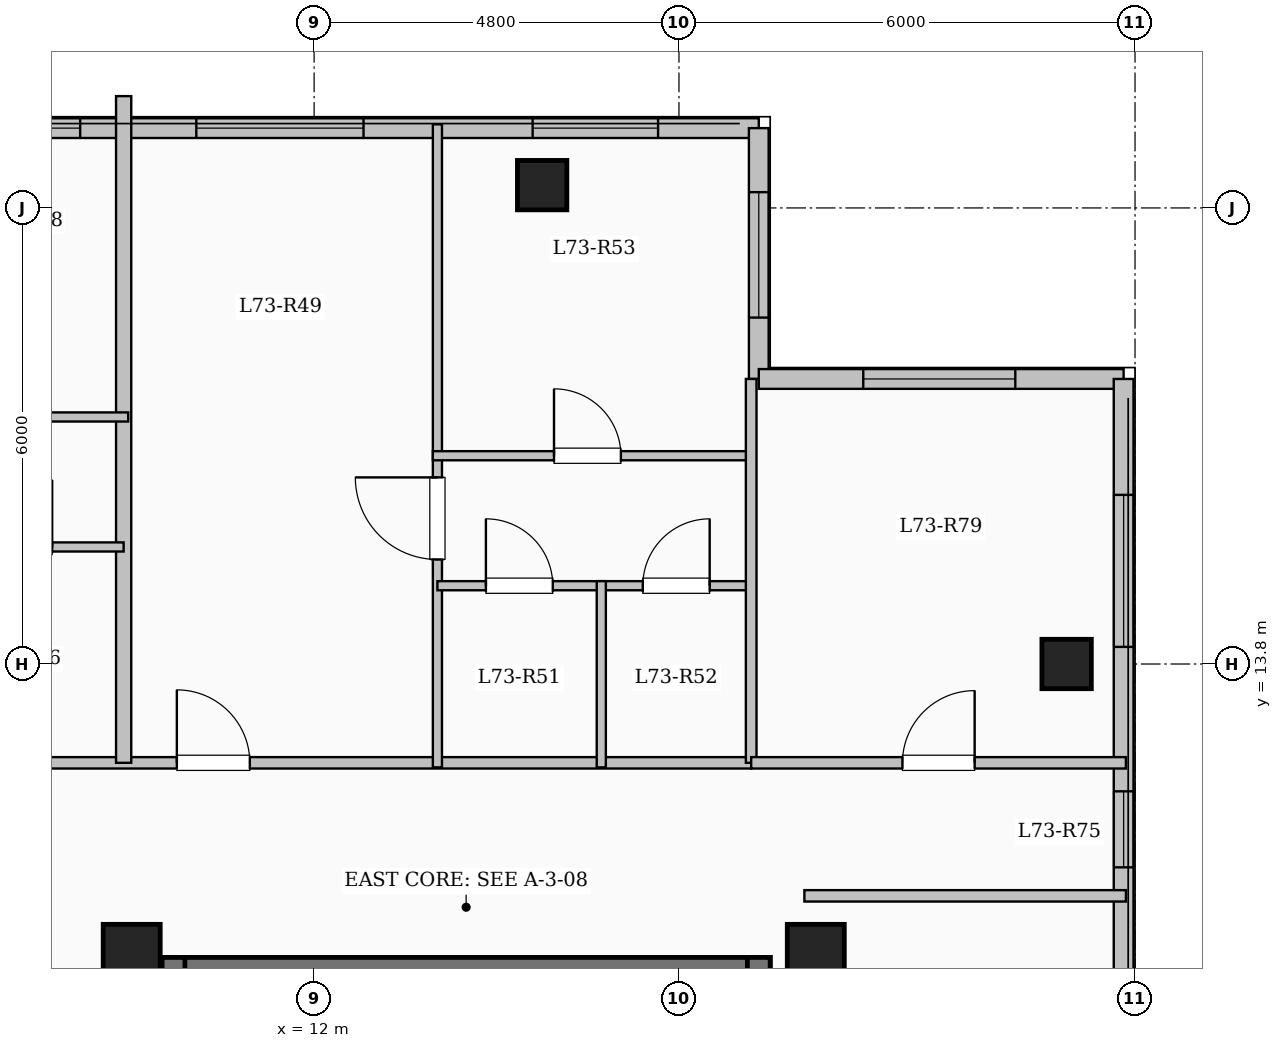
"""IFC4 building model, lengths in metres.
Left out: names, types, materials, properties, quantities, classifications, styles, units other than length and angle.
Written with IfcOpenShell. Run it as: python <this file> out.ifc"""

import sys

from ifc_helpers import new_model, si_unit, direction, frame, frame_2d, origin, origin_2d, place, context, subcontext, project, spatial, rectangle, extrude, element, fill, save


model = new_model("IFC4")
c1 = context("Model", 3, precision=1e-05, world=origin(), true_north=direction((0.0, 1.0)))
c2 = subcontext(c1, "Body", "Model", "MODEL_VIEW")
j1 = project(units=[si_unit("LENGTHUNIT", "METRE"), si_unit("PLANEANGLEUNIT", "RADIAN")], contexts=[c1])
p1 = place(None, origin())
s1 = spatial("IfcSite", under=j1, at=p1, CompositionType="ELEMENT")
p2 = place(p1, origin())
s2 = spatial("IfcBuilding", under=s1, at=p2, CompositionType="ELEMENT")
p3 = place(p2, frame((0.0, 0.0, 268.3)))
s3 = spatial("IfcBuildingStorey", under=s2, at=p3, CompositionType="ELEMENT", Elevation=268.3)
for number, where, z_axis, x_axis in (
    (1, (9.6, 10.0, 0.0), (0.0, 0.0, 1.0), (1.0, 0.0, 0.0)),
    (2, (18.6, 10.0, 0.0), (0.0, 0.0, 1.0), (1.0, 0.0, 0.0)),
):
    element("IfcColumn", number, at=place(p3, frame(where, z_axis=z_axis, x_axis=x_axis)), inside=s3, PredefinedType="COLUMN", context=c2, shape_type="SweptSolid", body=[
        extrude(rectangle(XDim=0.75, YDim=0.75, at=origin_2d()), origin(), (0.0, 0.0, 1.0), 3.35),
    ])
for number, where, z_axis, x_axis in (
    (3, (15.0, 20.1, 0.0), (0.0, 0.0, 1.0), (1.0, 0.0, 0.0)),
    (4, (21.9, 13.8, 0.0), (0.0, 0.0, 1.0), (1.0, 0.0, 0.0)),
):
    element("IfcColumn", number, at=place(p3, frame(where, z_axis=z_axis, x_axis=x_axis)), inside=s3, PredefinedType="COLUMN", context=c2, shape_type="SweptSolid", body=[
        extrude(rectangle(XDim=0.65, YDim=0.65, at=origin_2d()), origin(), (0.0, 0.0, 1.0), 3.35),
    ])
p4 = place(p3, frame((7.35, 20.85, 0.0), z_axis=(0.0, 0.0, 1.0), x_axis=(1.0, 0.0, 0.0)))
e5 = element("IfcWall", 5, at=p4, inside=s3, PredefinedType="SOLIDWALL", context=c2, shape_type="SweptSolid", body=[
    extrude(rectangle(XDim=10.5, YDim=0.26, at=frame_2d((5.25, 0.0))), origin(), (0.0, 0.0, 1.0), 3.05),
])
p5 = place(p4, frame((0.372, 0.0, 0.95)))
e6 = element("IfcOpeningElement", 6, at=p5, cuts=e5, PredefinedType="OPENING", context=c2, shape_type="SweptSolid", body=[
    extrude(rectangle(XDim=1.2, YDim=1.5, at=frame_2d((0.6, 0.75))), frame((0.0, 0.14, 0.0), z_axis=(0.0, -1.0, 0.0), x_axis=(1.0, 0.0, 0.0)), (0.0, 0.0, 1.0), 0.28),
])
p6 = place(p4, frame((3.1, 0.0, 0.9)))
e7 = element("IfcOpeningElement", 7, at=p6, cuts=e5, PredefinedType="OPENING", context=c2, shape_type="SweptSolid", body=[
    extrude(rectangle(XDim=2.2, YDim=1.75, at=frame_2d((1.1, 0.875))), frame((0.0, 0.14, 0.0), z_axis=(0.0, -1.0, 0.0), x_axis=(1.0, 0.0, 0.0)), (0.0, 0.0, 1.0), 0.28),
])
p7 = place(p4, frame((7.525, 0.0, 0.9)))
e8 = element("IfcOpeningElement", 8, at=p7, cuts=e5, PredefinedType="OPENING", context=c2, shape_type="SweptSolid", body=[
    extrude(rectangle(XDim=1.65, YDim=1.6, at=frame_2d((0.825, 0.8))), frame((0.0, 0.14, 0.0), z_axis=(0.0, -1.0, 0.0), x_axis=(1.0, 0.0, 0.0)), (0.0, 0.0, 1.0), 0.28),
])
p8 = place(p3, frame((17.85, 20.85, 0.0), z_axis=(0.0, 0.0, 1.0), x_axis=(0.0, -1.0, 0.0)))
e9 = element("IfcWall", 9, at=p8, inside=s3, PredefinedType="SOLIDWALL", context=c2, shape_type="SweptSolid", body=[
    extrude(rectangle(XDim=3.3, YDim=0.26, at=frame_2d((1.65, 0.0))), origin(), (0.0, 0.0, 1.0), 3.05),
])
p9 = place(p8, frame((0.843, 0.0, 0.9)))
e10 = element("IfcOpeningElement", 10, at=p9, cuts=e9, PredefinedType="OPENING", context=c2, shape_type="SweptSolid", body=[
    extrude(rectangle(XDim=1.65, YDim=1.6, at=frame_2d((0.825, 0.8))), frame((0.0, 0.14, 0.0), z_axis=(0.0, -1.0, 0.0), x_axis=(1.0, 0.0, 0.0)), (0.0, 0.0, 1.0), 0.28),
])
p10 = place(p3, frame((17.85, 17.55, 0.0), z_axis=(0.0, 0.0, 1.0), x_axis=(1.0, 0.0, 0.0)))
e11 = element("IfcWall", 11, at=p10, inside=s3, PredefinedType="SOLIDWALL", context=c2, shape_type="SweptSolid", body=[
    extrude(rectangle(XDim=4.8, YDim=0.26, at=frame_2d((2.4, 0.0))), origin(), (0.0, 0.0, 1.0), 3.05),
])
p11 = place(p10, frame((1.375, 0.0, 0.9)))
e12 = element("IfcOpeningElement", 12, at=p11, cuts=e11, PredefinedType="OPENING", context=c2, shape_type="SweptSolid", body=[
    extrude(rectangle(XDim=2.0, YDim=1.7, at=frame_2d((1.0, 0.85))), frame((0.0, 0.14, 0.0), z_axis=(0.0, -1.0, 0.0), x_axis=(1.0, 0.0, 0.0)), (0.0, 0.0, 1.0), 0.28),
])
p12 = place(p3, frame((22.65, 17.55, 0.0), z_axis=(0.0, 0.0, 1.0), x_axis=(0.0, -1.0, 0.0)))
e13 = element("IfcWall", 13, at=p12, inside=s3, PredefinedType="SOLIDWALL", context=c2, shape_type="SweptSolid", body=[
    extrude(rectangle(XDim=35.1, YDim=0.26, at=frame_2d((17.55, 0.0))), origin(), (0.0, 0.0, 1.0), 3.05),
])
p13 = place(p12, frame((1.525, 0.0, 0.9)))
e14 = element("IfcOpeningElement", 14, at=p13, cuts=e13, PredefinedType="OPENING", context=c2, shape_type="SweptSolid", body=[
    extrude(rectangle(XDim=2.0, YDim=1.7, at=frame_2d((1.0, 0.85))), frame((0.0, 0.14, 0.0), z_axis=(0.0, -1.0, 0.0), x_axis=(1.0, 0.0, 0.0)), (0.0, 0.0, 1.0), 0.28),
])
p14 = place(p12, frame((5.425, 0.0, 0.95)))
e15 = element("IfcOpeningElement", 15, at=p14, cuts=e13, PredefinedType="OPENING", context=c2, shape_type="SweptSolid", body=[
    extrude(rectangle(XDim=1.0, YDim=1.5, at=frame_2d((0.5, 0.75))), frame((0.0, 0.14, 0.0), z_axis=(0.0, -1.0, 0.0), x_axis=(1.0, 0.0, 0.0)), (0.0, 0.0, 1.0), 0.28),
])
p15 = place(p12, frame((8.675, 0.0, 0.9)))
e16 = element("IfcOpeningElement", 16, at=p15, cuts=e13, PredefinedType="OPENING", context=c2, shape_type="SweptSolid", body=[
    extrude(rectangle(XDim=2.0, YDim=1.7, at=frame_2d((1.0, 0.85))), frame((0.0, 0.14, 0.0), z_axis=(0.0, -1.0, 0.0), x_axis=(1.0, 0.0, 0.0)), (0.0, 0.0, 1.0), 0.28),
])
p16 = place(p12, frame((13.5, 0.0, 0.9)))
e17 = element("IfcOpeningElement", 17, at=p16, cuts=e13, PredefinedType="OPENING", context=c2, shape_type="SweptSolid", body=[
    extrude(rectangle(XDim=1.65, YDim=1.6, at=frame_2d((0.825, 0.8))), frame((0.0, 0.14, 0.0), z_axis=(0.0, -1.0, 0.0), x_axis=(1.0, 0.0, 0.0)), (0.0, 0.0, 1.0), 0.28),
])
p17 = place(p12, frame((19.35, 0.0, 0.9)))
e18 = element("IfcOpeningElement", 18, at=p17, cuts=e13, PredefinedType="OPENING", context=c2, shape_type="SweptSolid", body=[
    extrude(rectangle(XDim=2.2, YDim=1.75, at=frame_2d((1.1, 0.875))), frame((0.0, 0.14, 0.0), z_axis=(0.0, -1.0, 0.0), x_axis=(1.0, 0.0, 0.0)), (0.0, 0.0, 1.0), 0.28),
])
p18 = place(p12, frame((25.275, 0.0, 0.95)))
e19 = element("IfcOpeningElement", 19, at=p18, cuts=e13, PredefinedType="OPENING", context=c2, shape_type="SweptSolid", body=[
    extrude(rectangle(XDim=1.2, YDim=1.5, at=frame_2d((0.6, 0.75))), frame((0.0, 0.14, 0.0), z_axis=(0.0, -1.0, 0.0), x_axis=(1.0, 0.0, 0.0)), (0.0, 0.0, 1.0), 0.28),
])
p19 = place(p12, frame((29.925, 0.0, 0.9)))
e20 = element("IfcOpeningElement", 20, at=p19, cuts=e13, PredefinedType="OPENING", context=c2, shape_type="SweptSolid", body=[
    extrude(rectangle(XDim=2.2, YDim=1.75, at=frame_2d((1.1, 0.875))), frame((0.0, 0.14, 0.0), z_axis=(0.0, -1.0, 0.0), x_axis=(1.0, 0.0, 0.0)), (0.0, 0.0, 1.0), 0.28),
])
p20 = place(p3, frame((10.0, 9.79, 0.0), z_axis=(0.0, 0.0, 1.0), x_axis=(1.0, 0.0, 0.0)))
e21 = element("IfcWall", 21, at=p20, inside=s3, PredefinedType="SHEAR", context=c2, shape_type="SweptSolid", body=[
    extrude(rectangle(XDim=8.0, YDim=0.3, at=frame_2d((4.0, 0.0))), origin(), (0.0, 0.0, 1.0), 3.35),
])
for number, where, z_axis, x_axis in (
    (22, (10.15, 6.35, 0.0), (0.0, 0.0, 1.0), (0.0, 1.0, 0.0)),
    (23, (17.85, 6.35, 0.0), (0.0, 0.0, 1.0), (0.0, 1.0, 0.0)),
):
    element("IfcWall", number, at=place(p3, frame(where, z_axis=z_axis, x_axis=x_axis)), inside=s3, PredefinedType="SHEAR", context=c2, shape_type="SweptSolid", body=[
        extrude(rectangle(XDim=3.59, YDim=0.3, at=frame_2d((1.795, 0.0))), origin(), (0.0, 0.0, 1.0), 3.35),
    ])
p21 = place(p3, frame((3.85, 12.5, 0.0), z_axis=(0.0, 0.0, 1.0), x_axis=(1.0, 0.0, 0.0)))
e24 = element("IfcWall", 24, at=p21, inside=s3, PredefinedType="PARTITIONING", context=c2, shape_type="SweptSolid", body=[
    extrude(rectangle(XDim=13.9, YDim=0.15, at=frame_2d((6.95, 0.0))), origin(), (0.0, 0.0, 1.0), 3.05),
])
p22 = place(p21, frame((0.7, 0.0, 0.0)))
e25 = element("IfcOpeningElement", 25, at=p22, cuts=e24, PredefinedType="OPENING", context=c2, shape_type="SweptSolid", body=[
    extrude(rectangle(XDim=0.96, YDim=2.15, at=frame_2d((0.48, 1.075))), frame((0.0, 0.085, 0.0), z_axis=(0.0, -1.0, 0.0), x_axis=(1.0, 0.0, 0.0)), (0.0, 0.0, 1.0), 0.17),
])
p23 = place(p21, frame((6.344, 0.0, 0.0)))
e26 = element("IfcOpeningElement", 26, at=p23, cuts=e24, PredefinedType="OPENING", context=c2, shape_type="SweptSolid", body=[
    extrude(rectangle(XDim=0.96, YDim=2.15, at=frame_2d((0.48, 1.075))), frame((0.0, 0.085, 0.0), z_axis=(0.0, -1.0, 0.0), x_axis=(1.0, 0.0, 0.0)), (0.0, 0.0, 1.0), 0.17),
])
p24 = place(p3, frame((9.494, 12.5, 0.0), z_axis=(0.0, 0.0, 1.0), x_axis=(0.0, 1.0, 0.0)))
e27 = element("IfcWall", 27, at=p24, inside=s3, PredefinedType="SOLIDWALL", context=c2, shape_type="SweptSolid", body=[
    extrude(rectangle(XDim=8.771, YDim=0.2, at=frame_2d((4.385, 0.0))), origin(), (0.0, 0.0, 1.0), 3.05),
])
p25 = place(p3, frame((6.734, 15.34, 0.0), z_axis=(0.0, 0.0, 1.0), x_axis=(1.0, 0.0, 0.0)))
e28 = element("IfcWall", 28, at=p25, inside=s3, PredefinedType="PARTITIONING", context=c2, shape_type="SweptSolid", body=[
    extrude(rectangle(XDim=2.76, YDim=0.12, at=frame_2d((1.38, 0.0))), origin(), (0.0, 0.0, 1.0), 2.735),
])
p26 = place(p25, frame((0.94, 0.0, 0.0)))
e29 = element("IfcOpeningElement", 29, at=p26, cuts=e28, PredefinedType="OPENING", context=c2, shape_type="SweptSolid", body=[
    extrude(rectangle(XDim=0.88, YDim=2.1, at=frame_2d((0.44, 1.05))), frame((0.0, 0.07, 0.0), z_axis=(0.0, -1.0, 0.0), x_axis=(1.0, 0.0, 0.0)), (0.0, 0.0, 1.0), 0.14),
])
p27 = place(p3, frame((4.08, 17.05, 0.0), z_axis=(0.0, 0.0, 1.0), x_axis=(1.0, 0.0, 0.0)))
e30 = element("IfcWall", 30, at=p27, inside=s3, PredefinedType="PARTITIONING", context=c2, shape_type="SweptSolid", body=[
    extrude(rectangle(XDim=5.474, YDim=0.12, at=frame_2d((2.737, 0.0))), origin(), (0.0, 0.0, 1.0), 2.735),
])
p28 = place(p27, frame((0.883, 0.0, 0.0)))
e31 = element("IfcOpeningElement", 31, at=p28, cuts=e30, PredefinedType="OPENING", context=c2, shape_type="SweptSolid", body=[
    extrude(rectangle(XDim=0.88, YDim=2.1, at=frame_2d((0.44, 1.05))), frame((0.0, 0.07, 0.0), z_axis=(0.0, -1.0, 0.0), x_axis=(1.0, 0.0, 0.0)), (0.0, 0.0, 1.0), 0.14),
])
p29 = place(p27, frame((3.53, 0.0, 0.0)))
e32 = element("IfcOpeningElement", 32, at=p29, cuts=e30, PredefinedType="OPENING", context=c2, shape_type="SweptSolid", body=[
    extrude(rectangle(XDim=0.88, YDim=2.1, at=frame_2d((0.44, 1.05))), frame((0.0, 0.07, 0.0), z_axis=(0.0, -1.0, 0.0), x_axis=(1.0, 0.0, 0.0)), (0.0, 0.0, 1.0), 0.14),
])
p30 = place(p3, frame((13.622, 12.44, 0.0), z_axis=(0.0, 0.0, 1.0), x_axis=(0.0, 1.0, 0.0)))
e33 = element("IfcWall", 33, at=p30, inside=s3, PredefinedType="PARTITIONING", context=c2, shape_type="SweptSolid", body=[
    extrude(rectangle(XDim=8.46, YDim=0.12, at=frame_2d((4.23, 0.0))), origin(), (0.0, 0.0, 1.0), 3.05),
])
p31 = place(p30, frame((2.735, 0.0, 0.0)))
e34 = element("IfcOpeningElement", 34, at=p31, cuts=e33, PredefinedType="OPENING", context=c2, shape_type="SweptSolid", body=[
    extrude(rectangle(XDim=1.08, YDim=2.15, at=frame_2d((0.54, 1.075))), frame((0.0, 0.07, 0.0), z_axis=(0.0, -1.0, 0.0), x_axis=(1.0, 0.0, 0.0)), (0.0, 0.0, 1.0), 0.14),
])
p32 = place(p3, frame((13.622, 14.83, 0.0), z_axis=(0.0, 0.0, 1.0), x_axis=(1.0, 0.0, 0.0)))
e35 = element("IfcWall", 35, at=p32, inside=s3, PredefinedType="PARTITIONING", context=c2, shape_type="SweptSolid", body=[
    extrude(rectangle(XDim=2.156, YDim=0.12, at=frame_2d((1.078, 0.0))), origin(), (0.0, 0.0, 1.0), 3.05),
])
p33 = place(p32, frame((0.638, 0.0, 0.0)))
e36 = element("IfcOpeningElement", 36, at=p33, cuts=e35, PredefinedType="OPENING", context=c2, shape_type="SweptSolid", body=[
    extrude(rectangle(XDim=0.88, YDim=2.1, at=frame_2d((0.44, 1.05))), frame((0.0, 0.07, 0.0), z_axis=(0.0, -1.0, 0.0), x_axis=(1.0, 0.0, 0.0)), (0.0, 0.0, 1.0), 0.14),
])
p34 = place(p3, frame((15.778, 14.83, 0.0), z_axis=(0.0, 0.0, 1.0), x_axis=(1.0, 0.0, 0.0)))
e37 = element("IfcWall", 37, at=p34, inside=s3, PredefinedType="PARTITIONING", context=c2, shape_type="SweptSolid", body=[
    extrude(rectangle(XDim=1.972, YDim=0.12, at=frame_2d((0.986, 0.0))), origin(), (0.0, 0.0, 1.0), 3.05),
])
p35 = place(p34, frame((0.546, 0.0, 0.0)))
e38 = element("IfcOpeningElement", 38, at=p35, cuts=e37, PredefinedType="OPENING", context=c2, shape_type="SweptSolid", body=[
    extrude(rectangle(XDim=0.88, YDim=2.1, at=frame_2d((0.44, 1.05))), frame((0.0, 0.07, 0.0), z_axis=(0.0, -1.0, 0.0), x_axis=(1.0, 0.0, 0.0)), (0.0, 0.0, 1.0), 0.14),
])
p36 = place(p3, frame((13.562, 16.54, 0.0), z_axis=(0.0, 0.0, 1.0), x_axis=(1.0, 0.0, 0.0)))
e39 = element("IfcWall", 39, at=p36, inside=s3, PredefinedType="PARTITIONING", context=c2, shape_type="SweptSolid", body=[
    extrude(rectangle(XDim=4.248, YDim=0.12, at=frame_2d((2.124, 0.0))), origin(), (0.0, 0.0, 1.0), 3.05),
])
p37 = place(p36, frame((1.594, 0.0, 0.0)))
e40 = element("IfcOpeningElement", 40, at=p37, cuts=e39, PredefinedType="OPENING", context=c2, shape_type="SweptSolid", body=[
    extrude(rectangle(XDim=0.88, YDim=2.1, at=frame_2d((0.44, 1.05))), frame((0.0, 0.07, 0.0), z_axis=(0.0, -1.0, 0.0), x_axis=(1.0, 0.0, 0.0)), (0.0, 0.0, 1.0), 0.14),
])
p38 = place(p3, frame((15.778, 12.44, 0.0), z_axis=(0.0, 0.0, 1.0), x_axis=(0.0, 1.0, 0.0)))
e41 = element("IfcWall", 41, at=p38, inside=s3, PredefinedType="PARTITIONING", context=c2, shape_type="SweptSolid", body=[
    extrude(rectangle(XDim=2.45, YDim=0.12, at=frame_2d((1.225, 0.0))), origin(), (0.0, 0.0, 1.0), 3.05),
])
p39 = place(p3, frame((18.45, 10.75, 0.0), z_axis=(0.0, 0.0, 1.0), x_axis=(1.0, 0.0, 0.0)))
e42 = element("IfcWall", 42, at=p39, inside=s3, PredefinedType="PARTITIONING", context=c2, shape_type="SweptSolid", body=[
    extrude(rectangle(XDim=4.23, YDim=0.15, at=frame_2d((2.115, 0.0))), origin(), (0.0, 0.0, 1.0), 3.05),
])
p40 = place(p3, frame((17.75, 12.5, 0.0), z_axis=(0.0, 0.0, 1.0), x_axis=(0.0, 1.0, 0.0)))
e43 = element("IfcWall", 43, at=p40, inside=s3, PredefinedType="PARTITIONING", context=c2, shape_type="SweptSolid", body=[
    extrude(rectangle(XDim=5.05, YDim=0.14, at=frame_2d((2.525, 0.0))), origin(), (0.0, 0.0, 1.0), 3.05),
])
p41 = place(p3, frame((17.75, 12.5, 0.0), z_axis=(0.0, 0.0, 1.0), x_axis=(1.0, 0.0, 0.0)))
e44 = element("IfcWall", 44, at=p41, inside=s3, PredefinedType="PARTITIONING", context=c2, shape_type="SweptSolid", body=[
    extrude(rectangle(XDim=4.93, YDim=0.15, at=frame_2d((2.465, 0.0))), origin(), (0.0, 0.0, 1.0), 3.05),
])
p42 = place(p41, frame((1.99, 0.0, 0.0)))
e45 = element("IfcOpeningElement", 45, at=p42, cuts=e44, PredefinedType="OPENING", context=c2, shape_type="SweptSolid", body=[
    extrude(rectangle(XDim=0.95, YDim=2.15, at=frame_2d((0.475, 1.075))), frame((0.0, 0.085, 0.0), z_axis=(0.0, -1.0, 0.0), x_axis=(1.0, 0.0, 0.0)), (0.0, 0.0, 1.0), 0.17),
])
p43 = place(p5, origin())
e46 = element("IfcWindow", 46, at=p43, inside=s3, PartitioningType="SINGLE_PANEL", PredefinedType="WINDOW", context=c2, shape_type="SweptSolid", body=[
    extrude(rectangle(XDim=1.2, YDim=1.5, at=frame_2d((0.6, 0.75))), frame((0.0, 0.03, 0.0), z_axis=(0.0, -1.0, 0.0), x_axis=(1.0, 0.0, 0.0)), (0.0, 0.0, 1.0), 0.06),
])
fill(e6, e46)
p44 = place(p6, origin())
e47 = element("IfcWindow", 47, at=p44, inside=s3, PartitioningType="SINGLE_PANEL", PredefinedType="WINDOW", context=c2, shape_type="SweptSolid", body=[
    extrude(rectangle(XDim=2.2, YDim=1.75, at=frame_2d((1.1, 0.875))), frame((0.0, 0.03, 0.0), z_axis=(0.0, -1.0, 0.0), x_axis=(1.0, 0.0, 0.0)), (0.0, 0.0, 1.0), 0.06),
])
fill(e7, e47)
p45 = place(p7, origin())
e48 = element("IfcWindow", 48, at=p45, inside=s3, PartitioningType="SINGLE_PANEL", PredefinedType="WINDOW", context=c2, shape_type="SweptSolid", body=[
    extrude(rectangle(XDim=1.65, YDim=1.6, at=frame_2d((0.825, 0.8))), frame((0.0, 0.03, 0.0), z_axis=(0.0, -1.0, 0.0), x_axis=(1.0, 0.0, 0.0)), (0.0, 0.0, 1.0), 0.06),
])
fill(e8, e48)
p46 = place(p9, origin())
e49 = element("IfcWindow", 49, at=p46, inside=s3, PartitioningType="SINGLE_PANEL", PredefinedType="WINDOW", context=c2, shape_type="SweptSolid", body=[
    extrude(rectangle(XDim=1.65, YDim=1.6, at=frame_2d((0.825, 0.8))), frame((0.0, 0.03, 0.0), z_axis=(0.0, -1.0, 0.0), x_axis=(1.0, 0.0, 0.0)), (0.0, 0.0, 1.0), 0.06),
])
fill(e10, e49)
p47 = place(p11, origin())
e50 = element("IfcWindow", 50, at=p47, inside=s3, PartitioningType="SINGLE_PANEL", PredefinedType="WINDOW", context=c2, shape_type="SweptSolid", body=[
    extrude(rectangle(XDim=2.0, YDim=1.7, at=frame_2d((1.0, 0.85))), frame((0.0, 0.03, 0.0), z_axis=(0.0, -1.0, 0.0), x_axis=(1.0, 0.0, 0.0)), (0.0, 0.0, 1.0), 0.06),
])
fill(e12, e50)
p48 = place(p13, origin())
e51 = element("IfcWindow", 51, at=p48, inside=s3, PartitioningType="SINGLE_PANEL", PredefinedType="WINDOW", context=c2, shape_type="SweptSolid", body=[
    extrude(rectangle(XDim=2.0, YDim=1.7, at=frame_2d((1.0, 0.85))), frame((0.0, 0.03, 0.0), z_axis=(0.0, -1.0, 0.0), x_axis=(1.0, 0.0, 0.0)), (0.0, 0.0, 1.0), 0.06),
])
fill(e14, e51)
p49 = place(p14, origin())
e52 = element("IfcWindow", 52, at=p49, inside=s3, PartitioningType="SINGLE_PANEL", PredefinedType="WINDOW", context=c2, shape_type="SweptSolid", body=[
    extrude(rectangle(XDim=1.0, YDim=1.5, at=frame_2d((0.5, 0.75))), frame((0.0, 0.03, 0.0), z_axis=(0.0, -1.0, 0.0), x_axis=(1.0, 0.0, 0.0)), (0.0, 0.0, 1.0), 0.06),
])
fill(e15, e52)
p50 = place(p23, origin())
e53 = element("IfcDoor", 53, at=p50, inside=s3, OperationType="SINGLE_SWING_LEFT", PredefinedType="DOOR", context=c2, shape_type="SweptSolid", body=[
    extrude(rectangle(XDim=0.96, YDim=2.15, at=frame_2d((0.48, 1.075))), frame((0.0, 0.025, 0.0), z_axis=(0.0, -1.0, 0.0), x_axis=(1.0, 0.0, 0.0)), (0.0, 0.0, 1.0), 0.05),
])
fill(e26, e53)
p51 = place(p31, origin())
e54 = element("IfcDoor", 54, at=p51, inside=s3, OperationType="SINGLE_SWING_RIGHT", PredefinedType="DOOR", context=c2, shape_type="SweptSolid", body=[
    extrude(rectangle(XDim=1.08, YDim=2.15, at=frame_2d((0.54, 1.075))), frame((0.0, 0.025, 0.0), z_axis=(0.0, -1.0, 0.0), x_axis=(1.0, 0.0, 0.0)), (0.0, 0.0, 1.0), 0.05),
])
fill(e34, e54)
p52 = place(p33, origin())
e55 = element("IfcDoor", 55, at=p52, inside=s3, OperationType="SINGLE_SWING_LEFT", PredefinedType="DOOR", context=c2, shape_type="SweptSolid", body=[
    extrude(rectangle(XDim=0.88, YDim=2.1, at=frame_2d((0.44, 1.05))), frame((0.0, 0.025, 0.0), z_axis=(0.0, -1.0, 0.0), x_axis=(1.0, 0.0, 0.0)), (0.0, 0.0, 1.0), 0.05),
])
fill(e36, e55)
p53 = place(p35, origin())
e56 = element("IfcDoor", 56, at=p53, inside=s3, OperationType="SINGLE_SWING_RIGHT", PredefinedType="DOOR", context=c2, shape_type="SweptSolid", body=[
    extrude(rectangle(XDim=0.88, YDim=2.1, at=frame_2d((0.44, 1.05))), frame((0.0, 0.025, 0.0), z_axis=(0.0, -1.0, 0.0), x_axis=(1.0, 0.0, 0.0)), (0.0, 0.0, 1.0), 0.05),
])
fill(e38, e56)
p54 = place(p37, origin())
e57 = element("IfcDoor", 57, at=p54, inside=s3, OperationType="SINGLE_SWING_LEFT", PredefinedType="DOOR", context=c2, shape_type="SweptSolid", body=[
    extrude(rectangle(XDim=0.88, YDim=2.1, at=frame_2d((0.44, 1.05))), frame((0.0, 0.025, 0.0), z_axis=(0.0, -1.0, 0.0), x_axis=(1.0, 0.0, 0.0)), (0.0, 0.0, 1.0), 0.05),
])
fill(e40, e57)
p55 = place(p42, origin())
e58 = element("IfcDoor", 58, at=p55, inside=s3, OperationType="SINGLE_SWING_RIGHT", PredefinedType="DOOR", context=c2, shape_type="SweptSolid", body=[
    extrude(rectangle(XDim=0.95, YDim=2.15, at=frame_2d((0.475, 1.075))), frame((0.0, 0.025, 0.0), z_axis=(0.0, -1.0, 0.0), x_axis=(1.0, 0.0, 0.0)), (0.0, 0.0, 1.0), 0.05),
])
fill(e45, e58)
save(model, sys.argv[1])
